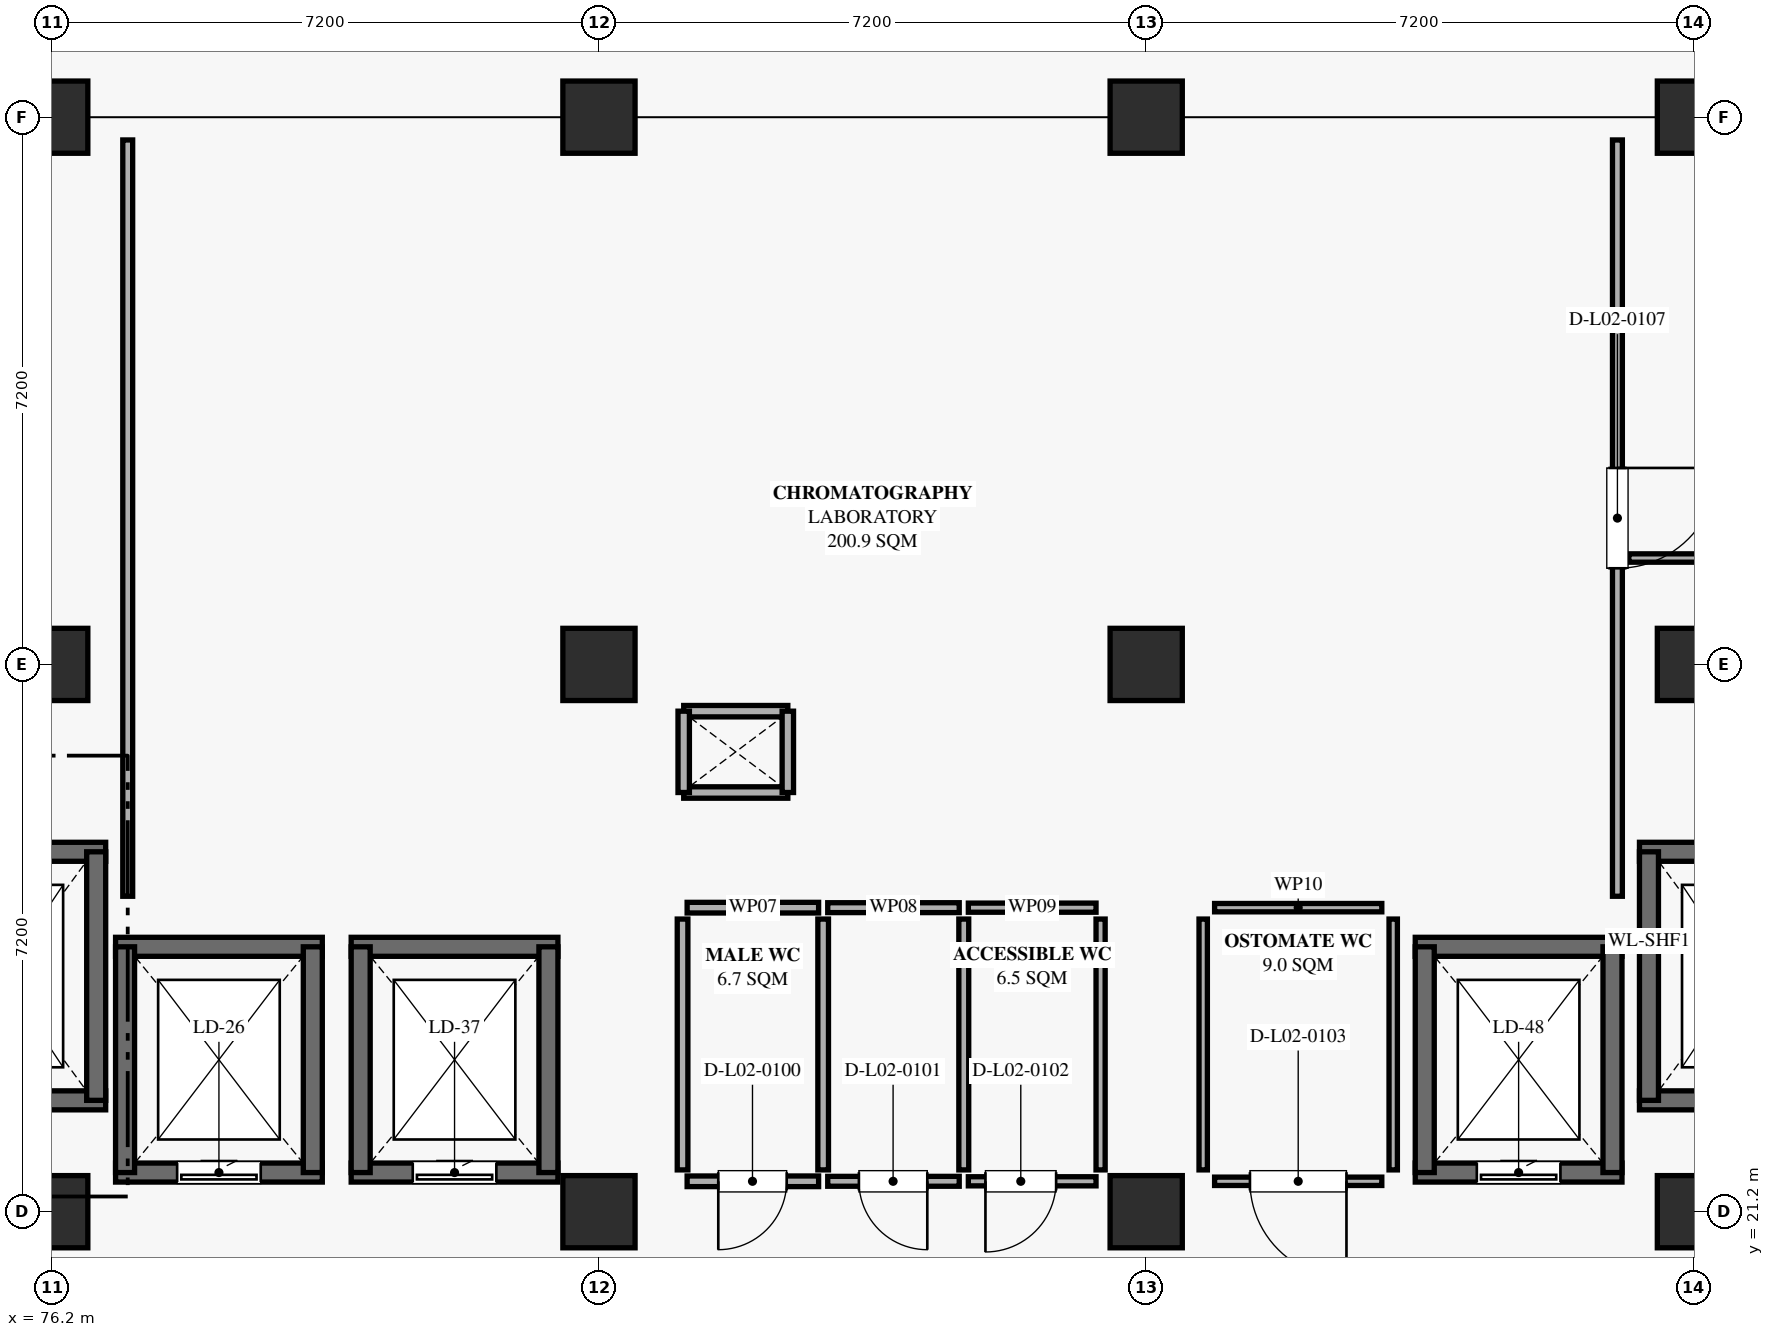
"""IFC4 building model, lengths in metres.
Left out: names, types, materials, properties, quantities, classifications, styles, units other than length and angle.
Written with IfcOpenShell. Run it as: python <this file> out.ifc"""

import sys

from ifc_helpers import new_model, si_unit, direction, frame, frame_2d, origin, origin_2d, place, context, subcontext, project, spatial, rectangle, extrude, element, fill, save


model = new_model("IFC4")
c1 = context("Model", 3, precision=1e-05, world=origin(), true_north=direction((0.0, 1.0)))
c2 = subcontext(c1, "Body", "Model", "MODEL_VIEW")
j1 = project(units=[si_unit("LENGTHUNIT", "METRE"), si_unit("PLANEANGLEUNIT", "RADIAN")], contexts=[c1])
p1 = place(None, origin())
s1 = spatial("IfcSite", under=j1, at=p1, CompositionType="ELEMENT")
p2 = place(p1, origin())
s2 = spatial("IfcBuilding", under=s1, at=p2, CompositionType="ELEMENT")
p3 = place(p2, frame((0.0, 0.0, 10.44)))
s3 = spatial("IfcBuildingStorey", under=s2, at=p3, CompositionType="ELEMENT", Elevation=10.44)
for number, where, z_axis, x_axis in (
    (1, (76.2, 21.2, 0.0), (0.0, 0.0, 1.0), (1.0, 0.0, 0.0)),
    (2, (83.4, 21.2, 0.0), (0.0, 0.0, 1.0), (1.0, 0.0, 0.0)),
    (3, (90.6, 21.2, 0.0), (0.0, 0.0, 1.0), (1.0, 0.0, 0.0)),
    (4, (97.8, 21.2, 0.0), (0.0, 0.0, 1.0), (1.0, 0.0, 0.0)),
    (5, (76.2, 28.4, 0.0), (0.0, 0.0, 1.0), (1.0, 0.0, 0.0)),
    (6, (83.4, 28.4, 0.0), (0.0, 0.0, 1.0), (1.0, 0.0, 0.0)),
    (7, (90.6, 28.4, 0.0), (0.0, 0.0, 1.0), (1.0, 0.0, 0.0)),
    (8, (97.8, 28.4, 0.0), (0.0, 0.0, 1.0), (1.0, 0.0, 0.0)),
    (9, (76.2, 35.6, 0.0), (0.0, 0.0, 1.0), (1.0, 0.0, 0.0)),
    (10, (83.4, 35.6, 0.0), (0.0, 0.0, 1.0), (1.0, 0.0, 0.0)),
    (11, (90.6, 35.6, 0.0), (0.0, 0.0, 1.0), (1.0, 0.0, 0.0)),
    (12, (97.8, 35.6, 0.0), (0.0, 0.0, 1.0), (1.0, 0.0, 0.0)),
):
    element("IfcColumn", number, at=place(p3, frame(where, z_axis=z_axis, x_axis=x_axis)), inside=s3, PredefinedType="COLUMN", context=c2, shape_type="SweptSolid", body=[
        extrude(rectangle(XDim=0.95, YDim=0.95, at=origin_2d()), origin(), (0.0, 0.0, 1.0), 4.68),
    ])
for number, where, z_axis, x_axis in (
    (13, (85.885, 26.715, 0.0), (0.0, 0.0, 1.0), (-1.0, 0.0, 0.0)),
    (14, (84.515, 27.785, 0.0), (0.0, 0.0, 1.0), (1.0, 0.0, 0.0)),
):
    element("IfcWall", number, at=place(p3, frame(where, z_axis=z_axis, x_axis=x_axis)), inside=s3, PredefinedType="PARTITIONING", context=c2, shape_type="SweptSolid", body=[
        extrude(rectangle(XDim=1.37, YDim=0.15, at=frame_2d((0.685, 0.0))), origin(), (0.0, 0.0, 1.0), 3.16),
    ])
for number, where, z_axis, x_axis in (
    (15, (84.515, 26.715, 0.0), (0.0, 0.0, 1.0), (0.0, 1.0, 0.0)),
    (16, (85.885, 27.785, 0.0), (0.0, 0.0, 1.0), (0.0, -1.0, 0.0)),
):
    element("IfcWall", number, at=place(p3, frame(where, z_axis=z_axis, x_axis=x_axis)), inside=s3, PredefinedType="PARTITIONING", context=c2, shape_type="SweptSolid", body=[
        extrude(rectangle(XDim=1.07, YDim=0.15, at=frame_2d((0.535, 0.0))), origin(), (0.0, 0.0, 1.0), 3.16),
    ])
for number, where, z_axis, x_axis in (
    (17, (76.91, 22.665, 0.0), (0.0, 0.0, 1.0), (-1.0, 0.0, 0.0)),
    (18, (74.19, 25.935, 0.0), (0.0, 0.0, 1.0), (1.0, 0.0, 0.0)),
):
    element("IfcWall", number, at=place(p3, frame(where, z_axis=z_axis, x_axis=x_axis)), inside=s3, PredefinedType="SHEAR", context=c2, shape_type="SweptSolid", body=[
        extrude(rectangle(XDim=2.72, YDim=0.25, at=frame_2d((1.36, 0.0))), origin(), (0.0, 0.0, 1.0), 4.41),
    ])
p4 = place(p3, frame((76.785, 25.935, 0.0), z_axis=(0.0, 0.0, 1.0), x_axis=(0.0, -1.0, 0.0)))
e19 = element("IfcWall", 19, at=p4, inside=s3, PredefinedType="SHEAR", context=c2, shape_type="SweptSolid", body=[
    extrude(rectangle(XDim=3.27, YDim=0.25, at=frame_2d((1.635, 0.0))), origin(), (0.0, 0.0, 1.0), 4.41),
])
for number, where, z_axis, x_axis in (
    (20, (99.81, 22.665, 0.0), (0.0, 0.0, 1.0), (-1.0, 0.0, 0.0)),
    (21, (97.09, 25.935, 0.0), (0.0, 0.0, 1.0), (1.0, 0.0, 0.0)),
):
    element("IfcWall", number, at=place(p3, frame(where, z_axis=z_axis, x_axis=x_axis)), inside=s3, PredefinedType="SHEAR", context=c2, shape_type="SweptSolid", body=[
        extrude(rectangle(XDim=2.72, YDim=0.25, at=frame_2d((1.36, 0.0))), origin(), (0.0, 0.0, 1.0), 4.41),
    ])
p5 = place(p3, frame((97.215, 22.665, 0.0), z_axis=(0.0, 0.0, 1.0), x_axis=(0.0, 1.0, 0.0)))
e22 = element("IfcWall", 22, at=p5, inside=s3, PredefinedType="SHEAR", context=c2, shape_type="SweptSolid", body=[
    extrude(rectangle(XDim=3.27, YDim=0.25, at=frame_2d((1.635, 0.0))), origin(), (0.0, 0.0, 1.0), 4.41),
])
p6 = place(p3, frame((79.76, 21.715, 0.0), z_axis=(0.0, 0.0, 1.0), x_axis=(-1.0, 0.0, 0.0)))
e23 = element("IfcWall", 23, at=p6, inside=s3, PredefinedType="SHEAR", context=c2, shape_type="SweptSolid", body=[
    extrude(rectangle(XDim=2.72, YDim=0.25, at=frame_2d((1.36, 0.0))), origin(), (0.0, 0.0, 1.0), 4.41),
])
p7 = place(p6, frame((0.81, 0.0, 0.0)))
e24 = element("IfcOpeningElement", 24, at=p7, cuts=e23, PredefinedType="OPENING", context=c2, shape_type="SweptSolid", body=[
    extrude(rectangle(XDim=1.1, YDim=2.2, at=frame_2d((0.55, 1.1))), frame((0.0, 0.135, 0.0), z_axis=(0.0, -1.0, 0.0), x_axis=(1.0, 0.0, 0.0)), (0.0, 0.0, 1.0), 0.27),
])
p8 = place(p3, frame((77.04, 24.685, 0.0), z_axis=(0.0, 0.0, 1.0), x_axis=(1.0, 0.0, 0.0)))
e25 = element("IfcWall", 25, at=p8, inside=s3, PredefinedType="SHEAR", context=c2, shape_type="SweptSolid", body=[
    extrude(rectangle(XDim=2.72, YDim=0.25, at=frame_2d((1.36, 0.0))), origin(), (0.0, 0.0, 1.0), 4.41),
])
for number, where, z_axis, x_axis in (
    (26, (77.165, 21.715, 0.0), (0.0, 0.0, 1.0), (0.0, 1.0, 0.0)),
    (27, (79.635, 24.685, 0.0), (0.0, 0.0, 1.0), (0.0, -1.0, 0.0)),
):
    element("IfcWall", number, at=place(p3, frame(where, z_axis=z_axis, x_axis=x_axis)), inside=s3, PredefinedType="SHEAR", context=c2, shape_type="SweptSolid", body=[
        extrude(rectangle(XDim=2.97, YDim=0.25, at=frame_2d((1.485, 0.0))), origin(), (0.0, 0.0, 1.0), 4.41),
    ])
p9 = place(p3, frame((82.86, 21.715, 0.0), z_axis=(0.0, 0.0, 1.0), x_axis=(-1.0, 0.0, 0.0)))
e28 = element("IfcWall", 28, at=p9, inside=s3, PredefinedType="SHEAR", context=c2, shape_type="SweptSolid", body=[
    extrude(rectangle(XDim=2.72, YDim=0.25, at=frame_2d((1.36, 0.0))), origin(), (0.0, 0.0, 1.0), 4.41),
])
p10 = place(p9, frame((0.81, 0.0, 0.0)))
e29 = element("IfcOpeningElement", 29, at=p10, cuts=e28, PredefinedType="OPENING", context=c2, shape_type="SweptSolid", body=[
    extrude(rectangle(XDim=1.1, YDim=2.2, at=frame_2d((0.55, 1.1))), frame((0.0, 0.135, 0.0), z_axis=(0.0, -1.0, 0.0), x_axis=(1.0, 0.0, 0.0)), (0.0, 0.0, 1.0), 0.27),
])
p11 = place(p3, frame((80.14, 24.685, 0.0), z_axis=(0.0, 0.0, 1.0), x_axis=(1.0, 0.0, 0.0)))
e30 = element("IfcWall", 30, at=p11, inside=s3, PredefinedType="SHEAR", context=c2, shape_type="SweptSolid", body=[
    extrude(rectangle(XDim=2.72, YDim=0.25, at=frame_2d((1.36, 0.0))), origin(), (0.0, 0.0, 1.0), 4.41),
])
for number, where, z_axis, x_axis in (
    (31, (80.265, 21.715, 0.0), (0.0, 0.0, 1.0), (0.0, 1.0, 0.0)),
    (32, (82.735, 24.685, 0.0), (0.0, 0.0, 1.0), (0.0, -1.0, 0.0)),
):
    element("IfcWall", number, at=place(p3, frame(where, z_axis=z_axis, x_axis=x_axis)), inside=s3, PredefinedType="SHEAR", context=c2, shape_type="SweptSolid", body=[
        extrude(rectangle(XDim=2.97, YDim=0.25, at=frame_2d((1.485, 0.0))), origin(), (0.0, 0.0, 1.0), 4.41),
    ])
p12 = place(p3, frame((96.86, 21.715, 0.0), z_axis=(0.0, 0.0, 1.0), x_axis=(-1.0, 0.0, 0.0)))
e33 = element("IfcWall", 33, at=p12, inside=s3, PredefinedType="SHEAR", context=c2, shape_type="SweptSolid", body=[
    extrude(rectangle(XDim=2.72, YDim=0.25, at=frame_2d((1.36, 0.0))), origin(), (0.0, 0.0, 1.0), 4.41),
])
p13 = place(p12, frame((0.81, 0.0, 0.0)))
e34 = element("IfcOpeningElement", 34, at=p13, cuts=e33, PredefinedType="OPENING", context=c2, shape_type="SweptSolid", body=[
    extrude(rectangle(XDim=1.1, YDim=2.2, at=frame_2d((0.55, 1.1))), frame((0.0, 0.135, 0.0), z_axis=(0.0, -1.0, 0.0), x_axis=(1.0, 0.0, 0.0)), (0.0, 0.0, 1.0), 0.27),
])
p14 = place(p3, frame((94.14, 24.685, 0.0), z_axis=(0.0, 0.0, 1.0), x_axis=(1.0, 0.0, 0.0)))
e35 = element("IfcWall", 35, at=p14, inside=s3, PredefinedType="SHEAR", context=c2, shape_type="SweptSolid", body=[
    extrude(rectangle(XDim=2.72, YDim=0.25, at=frame_2d((1.36, 0.0))), origin(), (0.0, 0.0, 1.0), 4.41),
])
for number, where, z_axis, x_axis in (
    (36, (94.265, 21.715, 0.0), (0.0, 0.0, 1.0), (0.0, 1.0, 0.0)),
    (37, (96.735, 24.685, 0.0), (0.0, 0.0, 1.0), (0.0, -1.0, 0.0)),
):
    element("IfcWall", number, at=place(p3, frame(where, z_axis=z_axis, x_axis=x_axis)), inside=s3, PredefinedType="SHEAR", context=c2, shape_type="SweptSolid", body=[
        extrude(rectangle(XDim=2.97, YDim=0.25, at=frame_2d((1.485, 0.0))), origin(), (0.0, 0.0, 1.0), 4.41),
    ])
p15 = place(p3, frame((86.29, 21.6, 0.0), z_axis=(0.0, 0.0, 1.0), x_axis=(-1.0, 0.0, 0.0)))
e38 = element("IfcWall", 38, at=p15, inside=s3, PredefinedType="PARTITIONING", context=c2, shape_type="SweptSolid", body=[
    extrude(rectangle(XDim=1.73, YDim=0.14, at=frame_2d((0.865, 0.0))), origin(), (0.0, 0.0, 1.0), 3.16),
])
p16 = place(p15, frame((0.42, 0.0, 0.0)))
e39 = element("IfcOpeningElement", 39, at=p16, cuts=e38, PredefinedType="OPENING", context=c2, shape_type="SweptSolid", body=[
    extrude(rectangle(XDim=0.9, YDim=2.16, at=frame_2d((0.45, 1.08))), frame((0.0, 0.08, 0.0), z_axis=(0.0, -1.0, 0.0), x_axis=(1.0, 0.0, 0.0)), (0.0, 0.0, 1.0), 0.16),
])
p17 = place(p3, frame((84.56, 25.2, 0.0), z_axis=(0.0, 0.0, 1.0), x_axis=(1.0, 0.0, 0.0)))
e40 = element("IfcWall", 40, at=p17, inside=s3, PredefinedType="PARTITIONING", context=c2, shape_type="SweptSolid", body=[
    extrude(rectangle(XDim=1.73, YDim=0.14, at=frame_2d((0.865, 0.0))), origin(), (0.0, 0.0, 1.0), 3.16),
])
for number, where, z_axis, x_axis in (
    (41, (84.5, 21.75, 0.0), (0.0, 0.0, 1.0), (0.0, 1.0, 0.0)),
    (42, (86.35, 25.05, 0.0), (0.0, 0.0, 1.0), (0.0, -1.0, 0.0)),
):
    element("IfcWall", number, at=place(p3, frame(where, z_axis=z_axis, x_axis=x_axis)), inside=s3, PredefinedType="PARTITIONING", context=c2, shape_type="SweptSolid", body=[
        extrude(rectangle(XDim=3.3, YDim=0.14, at=frame_2d((1.65, 0.0))), origin(), (0.0, 0.0, 1.0), 3.16),
    ])
p18 = place(p3, frame((88.14, 21.6, 0.0), z_axis=(0.0, 0.0, 1.0), x_axis=(-1.0, 0.0, 0.0)))
e43 = element("IfcWall", 43, at=p18, inside=s3, PredefinedType="PARTITIONING", context=c2, shape_type="SweptSolid", body=[
    extrude(rectangle(XDim=1.73, YDim=0.13, at=frame_2d((0.865, 0.0))), origin(), (0.0, 0.0, 1.0), 3.16),
])
p19 = place(p18, frame((0.42, 0.0, 0.0)))
e44 = element("IfcOpeningElement", 44, at=p19, cuts=e43, PredefinedType="OPENING", context=c2, shape_type="SweptSolid", body=[
    extrude(rectangle(XDim=0.9, YDim=2.22, at=frame_2d((0.45, 1.11))), frame((0.0, 0.075, 0.0), z_axis=(0.0, -1.0, 0.0), x_axis=(1.0, 0.0, 0.0)), (0.0, 0.0, 1.0), 0.15),
])
p20 = place(p3, frame((86.41, 25.2, 0.0), z_axis=(0.0, 0.0, 1.0), x_axis=(1.0, 0.0, 0.0)))
e45 = element("IfcWall", 45, at=p20, inside=s3, PredefinedType="PARTITIONING", context=c2, shape_type="SweptSolid", body=[
    extrude(rectangle(XDim=1.73, YDim=0.13, at=frame_2d((0.865, 0.0))), origin(), (0.0, 0.0, 1.0), 3.16),
])
p21 = place(p3, frame((88.2, 25.05, 0.0), z_axis=(0.0, 0.0, 1.0), x_axis=(0.0, -1.0, 0.0)))
e46 = element("IfcWall", 46, at=p21, inside=s3, PredefinedType="PARTITIONING", context=c2, shape_type="SweptSolid", body=[
    extrude(rectangle(XDim=3.3, YDim=0.13, at=frame_2d((1.65, 0.0))), origin(), (0.0, 0.0, 1.0), 3.16),
])
p22 = place(p3, frame((89.94, 21.6, 0.0), z_axis=(0.0, 0.0, 1.0), x_axis=(-1.0, 0.0, 0.0)))
e47 = element("IfcWall", 47, at=p22, inside=s3, PredefinedType="PARTITIONING", context=c2, shape_type="SweptSolid", body=[
    extrude(rectangle(XDim=1.68, YDim=0.12, at=frame_2d((0.84, 0.0))), origin(), (0.0, 0.0, 1.0), 3.16),
])
p23 = place(p22, frame((0.525, 0.0, 0.0)))
e48 = element("IfcOpeningElement", 48, at=p23, cuts=e47, PredefinedType="OPENING", context=c2, shape_type="SweptSolid", body=[
    extrude(rectangle(XDim=0.93, YDim=2.05, at=frame_2d((0.465, 1.025))), frame((0.0, 0.07, 0.0), z_axis=(0.0, -1.0, 0.0), x_axis=(1.0, 0.0, 0.0)), (0.0, 0.0, 1.0), 0.14),
])
p24 = place(p3, frame((88.26, 25.2, 0.0), z_axis=(0.0, 0.0, 1.0), x_axis=(1.0, 0.0, 0.0)))
e49 = element("IfcWall", 49, at=p24, inside=s3, PredefinedType="PARTITIONING", context=c2, shape_type="SweptSolid", body=[
    extrude(rectangle(XDim=1.68, YDim=0.12, at=frame_2d((0.84, 0.0))), origin(), (0.0, 0.0, 1.0), 3.16),
])
p25 = place(p3, frame((90.0, 25.05, 0.0), z_axis=(0.0, 0.0, 1.0), x_axis=(0.0, -1.0, 0.0)))
e50 = element("IfcWall", 50, at=p25, inside=s3, PredefinedType="PARTITIONING", context=c2, shape_type="SweptSolid", body=[
    extrude(rectangle(XDim=3.3, YDim=0.12, at=frame_2d((1.65, 0.0))), origin(), (0.0, 0.0, 1.0), 3.16),
])
p26 = place(p3, frame((93.7, 21.6, 0.0), z_axis=(0.0, 0.0, 1.0), x_axis=(-1.0, 0.0, 0.0)))
e51 = element("IfcWall", 51, at=p26, inside=s3, PredefinedType="PARTITIONING", context=c2, shape_type="SweptSolid", body=[
    extrude(rectangle(XDim=2.2, YDim=0.11, at=frame_2d((1.1, 0.0))), origin(), (0.0, 0.0, 1.0), 3.16),
])
p27 = place(p26, frame((0.465, 0.0, 0.0)))
e52 = element("IfcOpeningElement", 52, at=p27, cuts=e51, PredefinedType="OPENING", context=c2, shape_type="SweptSolid", body=[
    extrude(rectangle(XDim=1.27, YDim=2.1, at=frame_2d((0.635, 1.05))), frame((0.0, 0.065, 0.0), z_axis=(0.0, -1.0, 0.0), x_axis=(1.0, 0.0, 0.0)), (0.0, 0.0, 1.0), 0.13),
])
p28 = place(p3, frame((91.5, 25.2, 0.0), z_axis=(0.0, 0.0, 1.0), x_axis=(1.0, 0.0, 0.0)))
e53 = element("IfcWall", 53, at=p28, inside=s3, PredefinedType="PARTITIONING", context=c2, shape_type="SweptSolid", body=[
    extrude(rectangle(XDim=2.2, YDim=0.11, at=frame_2d((1.1, 0.0))), origin(), (0.0, 0.0, 1.0), 3.16),
])
for number, where, z_axis, x_axis in (
    (54, (91.35, 21.75, 0.0), (0.0, 0.0, 1.0), (0.0, 1.0, 0.0)),
    (55, (93.85, 25.05, 0.0), (0.0, 0.0, 1.0), (0.0, -1.0, 0.0)),
):
    element("IfcWall", number, at=place(p3, frame(where, z_axis=z_axis, x_axis=x_axis)), inside=s3, PredefinedType="PARTITIONING", context=c2, shape_type="SweptSolid", body=[
        extrude(rectangle(XDim=3.3, YDim=0.11, at=frame_2d((1.65, 0.0))), origin(), (0.0, 0.0, 1.0), 3.16),
    ])
p29 = place(p3, frame((77.2, 25.35, 0.0), z_axis=(0.0, 0.0, 1.0), x_axis=(0.0, 1.0, 0.0)))
e56 = element("IfcWall", 56, at=p29, inside=s3, PredefinedType="PARTITIONING", context=c2, shape_type="SweptSolid", body=[
    extrude(rectangle(XDim=9.95, YDim=0.13, at=frame_2d((4.975, 0.0))), origin(), (0.0, 0.0, 1.0), 3.16),
])
p30 = place(p3, frame((96.8, 35.3, 0.0), z_axis=(0.0, 0.0, 1.0), x_axis=(0.0, -1.0, 0.0)))
e57 = element("IfcWall", 57, at=p30, inside=s3, PredefinedType="PARTITIONING", context=c2, shape_type="SweptSolid", body=[
    extrude(rectangle(XDim=9.95, YDim=0.13, at=frame_2d((4.975, 0.0))), origin(), (0.0, 0.0, 1.0), 3.16),
])
p31 = place(p30, frame((4.315, 0.0, 0.0)))
e58 = element("IfcOpeningElement", 58, at=p31, cuts=e57, PredefinedType="OPENING", context=c2, shape_type="SweptSolid", body=[
    extrude(rectangle(XDim=1.32, YDim=2.1, at=frame_2d((0.66, 1.05))), frame((0.0, 0.075, 0.0), z_axis=(0.0, -1.0, 0.0), x_axis=(1.0, 0.0, 0.0)), (0.0, 0.0, 1.0), 0.15),
])
p32 = place(p3, frame((111.03, 29.8, 0.0), z_axis=(0.0, 0.0, 1.0), x_axis=(-1.0, 0.0, 0.0)))
e59 = element("IfcWall", 59, at=p32, inside=s3, PredefinedType="PARTITIONING", context=c2, shape_type="SweptSolid", body=[
    extrude(rectangle(XDim=14.08, YDim=0.11, at=frame_2d((7.04, 0.0))), origin(), (0.0, 0.0, 1.0), 3.16),
])
p33 = place(p32, frame((8.97, 0.0, 0.0)))
e60 = element("IfcOpeningElement", 60, at=p33, cuts=e59, PredefinedType="OPENING", context=c2, shape_type="SweptSolid", body=[
    extrude(rectangle(XDim=1.32, YDim=2.16, at=frame_2d((0.66, 1.08))), frame((0.0, 0.065, 0.0), z_axis=(0.0, -1.0, 0.0), x_axis=(1.0, 0.0, 0.0)), (0.0, 0.0, 1.0), 0.13),
])
p34 = place(p7, origin())
e61 = element("IfcDoor", 61, at=p34, inside=s3, OperationType="SLIDING_TO_LEFT", PredefinedType="DOOR", context=c2, shape_type="SweptSolid", body=[
    extrude(rectangle(XDim=1.1, YDim=2.2, at=frame_2d((0.55, 1.1))), frame((0.0, 0.025, 0.0), z_axis=(0.0, -1.0, 0.0), x_axis=(1.0, 0.0, 0.0)), (0.0, 0.0, 1.0), 0.05),
])
fill(e24, e61)
p35 = place(p10, origin())
e62 = element("IfcDoor", 62, at=p35, inside=s3, OperationType="SLIDING_TO_LEFT", PredefinedType="DOOR", context=c2, shape_type="SweptSolid", body=[
    extrude(rectangle(XDim=1.1, YDim=2.2, at=frame_2d((0.55, 1.1))), frame((0.0, 0.025, 0.0), z_axis=(0.0, -1.0, 0.0), x_axis=(1.0, 0.0, 0.0)), (0.0, 0.0, 1.0), 0.05),
])
fill(e29, e62)
p36 = place(p13, origin())
e63 = element("IfcDoor", 63, at=p36, inside=s3, OperationType="SLIDING_TO_LEFT", PredefinedType="DOOR", context=c2, shape_type="SweptSolid", body=[
    extrude(rectangle(XDim=1.1, YDim=2.2, at=frame_2d((0.55, 1.1))), frame((0.0, 0.025, 0.0), z_axis=(0.0, -1.0, 0.0), x_axis=(1.0, 0.0, 0.0)), (0.0, 0.0, 1.0), 0.05),
])
fill(e34, e63)
p37 = place(p16, origin())
e64 = element("IfcDoor", 64, at=p37, inside=s3, OperationType="SINGLE_SWING_RIGHT", PredefinedType="DOOR", context=c2, shape_type="SweptSolid", body=[
    extrude(rectangle(XDim=0.9, YDim=2.16, at=frame_2d((0.45, 1.08))), frame((0.0, 0.025, 0.0), z_axis=(0.0, -1.0, 0.0), x_axis=(1.0, 0.0, 0.0)), (0.0, 0.0, 1.0), 0.05),
])
fill(e39, e64)
p38 = place(p19, origin())
e65 = element("IfcDoor", 65, at=p38, inside=s3, OperationType="SINGLE_SWING_LEFT", PredefinedType="DOOR", context=c2, shape_type="SweptSolid", body=[
    extrude(rectangle(XDim=0.9, YDim=2.22, at=frame_2d((0.45, 1.11))), frame((0.0, 0.025, 0.0), z_axis=(0.0, -1.0, 0.0), x_axis=(1.0, 0.0, 0.0)), (0.0, 0.0, 1.0), 0.05),
])
fill(e44, e65)
p39 = place(p23, origin())
e66 = element("IfcDoor", 66, at=p39, inside=s3, OperationType="SINGLE_SWING_RIGHT", PredefinedType="DOOR", context=c2, shape_type="SweptSolid", body=[
    extrude(rectangle(XDim=0.93, YDim=2.05, at=frame_2d((0.465, 1.025))), frame((0.0, 0.025, 0.0), z_axis=(0.0, -1.0, 0.0), x_axis=(1.0, 0.0, 0.0)), (0.0, 0.0, 1.0), 0.05),
])
fill(e48, e66)
p40 = place(p27, origin())
e67 = element("IfcDoor", 67, at=p40, inside=s3, OperationType="SINGLE_SWING_LEFT", PredefinedType="DOOR", context=c2, shape_type="SweptSolid", body=[
    extrude(rectangle(XDim=1.27, YDim=2.1, at=frame_2d((0.635, 1.05))), frame((0.0, 0.025, 0.0), z_axis=(0.0, -1.0, 0.0), x_axis=(1.0, 0.0, 0.0)), (0.0, 0.0, 1.0), 0.05),
])
fill(e52, e67)
p41 = place(p31, origin())
e68 = element("IfcDoor", 68, at=p41, inside=s3, OperationType="SINGLE_SWING_LEFT", PredefinedType="DOOR", context=c2, shape_type="SweptSolid", body=[
    extrude(rectangle(XDim=1.32, YDim=2.1, at=frame_2d((0.66, 1.05))), frame((0.0, 0.025, 0.0), z_axis=(0.0, -1.0, 0.0), x_axis=(1.0, 0.0, 0.0)), (0.0, 0.0, 1.0), 0.05),
])
fill(e58, e68)
save(model, sys.argv[1])
